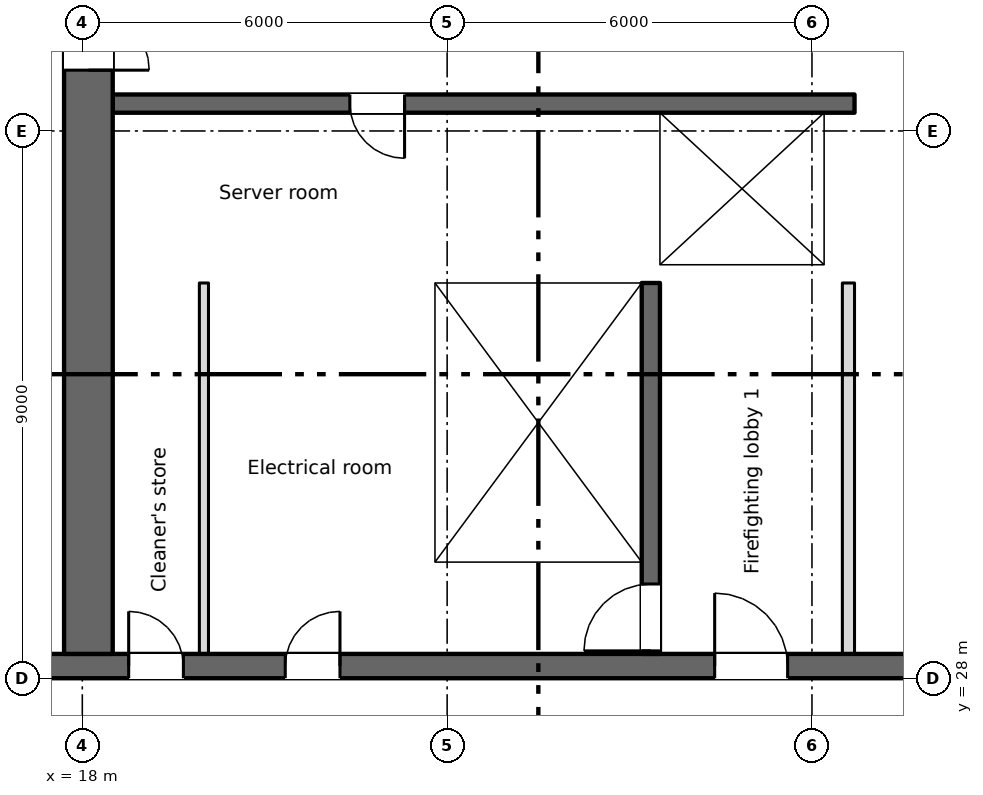
"""IFC4 building model, lengths in metres.
Left out: names, types, materials, properties, quantities, classifications, styles, units other than length and angle.
Written with IfcOpenShell. Run it as: python <this file> out.ifc"""

import sys

from ifc_helpers import new_model, si_unit, direction, frame, frame_2d, origin, place, context, subcontext, project, spatial, rectangle, extrude, element, fill, save


model = new_model("IFC4")
c1 = context("Model", 3, precision=1e-05, world=origin(), true_north=direction((0.0, 1.0)))
c2 = subcontext(c1, "Body", "Model", "MODEL_VIEW")
j1 = project(units=[si_unit("LENGTHUNIT", "METRE"), si_unit("PLANEANGLEUNIT", "RADIAN")], contexts=[c1])
p1 = place(None, origin())
s1 = spatial("IfcSite", under=j1, at=p1, CompositionType="ELEMENT")
p2 = place(p1, origin())
s2 = spatial("IfcBuilding", under=s1, at=p2, CompositionType="ELEMENT")
p3 = place(p2, frame((0.0, 0.0, 121.25)))
s3 = spatial("IfcBuildingStorey", under=s2, at=p3, CompositionType="ELEMENT", Elevation=121.25)
p4 = place(p3, frame((6.7, 28.2, 0.0), z_axis=(0.0, 0.0, 1.0), x_axis=(1.0, 0.0, 0.0)))
e1 = element("IfcWall", 1, at=p4, inside=s3, PredefinedType="SHEAR", context=c2, shape_type="SweptSolid", body=[
    extrude(rectangle(XDim=57.8, YDim=0.4, at=frame_2d((28.9, 0.0))), origin(), (0.0, 0.0, 1.0), 3.35),
])
p5 = place(p4, frame((12.062, 0.0, 0.0)))
e2 = element("IfcOpeningElement", 2, at=p5, cuts=e1, PredefinedType="OPENING", context=c2, shape_type="SweptSolid", body=[
    extrude(rectangle(XDim=0.9, YDim=2.1, at=frame_2d((0.45, 1.05))), frame((0.0, 0.21, 0.0), z_axis=(0.0, -1.0, 0.0), x_axis=(1.0, 0.0, 0.0)), (0.0, 0.0, 1.0), 0.42),
])
p6 = place(p4, frame((14.637, 0.0, 0.0)))
e3 = element("IfcOpeningElement", 3, at=p6, cuts=e1, PredefinedType="OPENING", context=c2, shape_type="SweptSolid", body=[
    extrude(rectangle(XDim=0.9, YDim=2.1, at=frame_2d((0.45, 1.05))), frame((0.0, 0.21, 0.0), z_axis=(0.0, -1.0, 0.0), x_axis=(1.0, 0.0, 0.0)), (0.0, 0.0, 1.0), 0.42),
])
p7 = place(p4, frame((49.062, 0.0, 0.0)))
e4 = element("IfcOpeningElement", 4, at=p7, cuts=e1, PredefinedType="OPENING", context=c2, shape_type="SweptSolid", body=[
    extrude(rectangle(XDim=0.9, YDim=2.1, at=frame_2d((0.45, 1.05))), frame((0.0, 0.21, 0.0), z_axis=(0.0, -1.0, 0.0), x_axis=(1.0, 0.0, 0.0)), (0.0, 0.0, 1.0), 0.42),
])
p8 = place(p4, frame((51.637, 0.0, 0.0)))
e5 = element("IfcOpeningElement", 5, at=p8, cuts=e1, PredefinedType="OPENING", context=c2, shape_type="SweptSolid", body=[
    extrude(rectangle(XDim=0.9, YDim=2.1, at=frame_2d((0.45, 1.05))), frame((0.0, 0.21, 0.0), z_axis=(0.0, -1.0, 0.0), x_axis=(1.0, 0.0, 0.0)), (0.0, 0.0, 1.0), 0.42),
])
p9 = place(p4, frame((1.35, 0.0, 0.0)))
e6 = element("IfcOpeningElement", 6, at=p9, cuts=e1, PredefinedType="OPENING", context=c2, shape_type="SweptSolid", body=[
    extrude(rectangle(XDim=0.9, YDim=2.1, at=frame_2d((0.45, 1.05))), frame((0.0, 0.21, 0.0), z_axis=(0.0, -1.0, 0.0), x_axis=(1.0, 0.0, 0.0)), (0.0, 0.0, 1.0), 0.42),
])
p10 = place(p4, frame((4.7, 0.0, 0.0)))
e7 = element("IfcOpeningElement", 7, at=p10, cuts=e1, PredefinedType="OPENING", context=c2, shape_type="SweptSolid", body=[
    extrude(rectangle(XDim=1.2, YDim=2.1, at=frame_2d((0.6, 1.05))), frame((0.0, 0.21, 0.0), z_axis=(0.0, -1.0, 0.0), x_axis=(1.0, 0.0, 0.0)), (0.0, 0.0, 1.0), 0.42),
])
p11 = place(p4, frame((31.7, 0.0, 0.0)))
e8 = element("IfcOpeningElement", 8, at=p11, cuts=e1, PredefinedType="OPENING", context=c2, shape_type="SweptSolid", body=[
    extrude(rectangle(XDim=1.2, YDim=2.1, at=frame_2d((0.6, 1.05))), frame((0.0, 0.21, 0.0), z_axis=(0.0, -1.0, 0.0), x_axis=(1.0, 0.0, 0.0)), (0.0, 0.0, 1.0), 0.42),
])
p12 = place(p4, frame((55.2, 0.0, 0.0)))
e9 = element("IfcOpeningElement", 9, at=p12, cuts=e1, PredefinedType="OPENING", context=c2, shape_type="SweptSolid", body=[
    extrude(rectangle(XDim=1.2, YDim=2.1, at=frame_2d((0.6, 1.05))), frame((0.0, 0.21, 0.0), z_axis=(0.0, -1.0, 0.0), x_axis=(1.0, 0.0, 0.0)), (0.0, 0.0, 1.0), 0.42),
])
p13 = place(p4, frame((21.7, 0.0, 0.0)))
e10 = element("IfcOpeningElement", 10, at=p13, cuts=e1, PredefinedType="OPENING", context=c2, shape_type="SweptSolid", body=[
    extrude(rectangle(XDim=1.2, YDim=2.1, at=frame_2d((0.6, 1.05))), frame((0.0, 0.21, 0.0), z_axis=(0.0, -1.0, 0.0), x_axis=(1.0, 0.0, 0.0)), (0.0, 0.0, 1.0), 0.42),
])
p14 = place(p4, frame((41.7, 0.0, 0.0)))
e11 = element("IfcOpeningElement", 11, at=p14, cuts=e1, PredefinedType="OPENING", context=c2, shape_type="SweptSolid", body=[
    extrude(rectangle(XDim=1.2, YDim=2.1, at=frame_2d((0.6, 1.05))), frame((0.0, 0.21, 0.0), z_axis=(0.0, -1.0, 0.0), x_axis=(1.0, 0.0, 0.0)), (0.0, 0.0, 1.0), 0.42),
])
p15 = place(p4, frame((24.85, 0.0, 0.0)))
e12 = element("IfcOpeningElement", 12, at=p15, cuts=e1, PredefinedType="OPENING", context=c2, shape_type="SweptSolid", body=[
    extrude(rectangle(XDim=2.4, YDim=2.1, at=frame_2d((1.2, 1.05))), frame((0.0, 0.21, 0.0), z_axis=(0.0, -1.0, 0.0), x_axis=(1.0, 0.0, 0.0)), (0.0, 0.0, 1.0), 0.42),
])
p16 = place(p4, frame((37.35, 0.0, 0.0)))
e13 = element("IfcOpeningElement", 13, at=p16, cuts=e1, PredefinedType="OPENING", context=c2, shape_type="SweptSolid", body=[
    extrude(rectangle(XDim=2.4, YDim=2.1, at=frame_2d((1.2, 1.05))), frame((0.0, 0.21, 0.0), z_axis=(0.0, -1.0, 0.0), x_axis=(1.0, 0.0, 0.0)), (0.0, 0.0, 1.0), 0.42),
])
p17 = place(p4, frame((7.95, 0.0, 0.0)))
e14 = element("IfcOpeningElement", 14, at=p17, cuts=e1, PredefinedType="OPENING", context=c2, shape_type="SweptSolid", body=[
    extrude(rectangle(XDim=2.4, YDim=2.1, at=frame_2d((1.2, 1.05))), frame((0.0, 0.21, 0.0), z_axis=(0.0, -1.0, 0.0), x_axis=(1.0, 0.0, 0.0)), (0.0, 0.0, 1.0), 0.42),
])
p18 = place(p4, frame((28.85, 0.0, 0.0)))
e15 = element("IfcOpeningElement", 15, at=p18, cuts=e1, PredefinedType="OPENING", context=c2, shape_type="SweptSolid", body=[
    extrude(rectangle(XDim=0.9, YDim=2.1, at=frame_2d((0.45, 1.05))), frame((0.0, 0.21, 0.0), z_axis=(0.0, -1.0, 0.0), x_axis=(1.0, 0.0, 0.0)), (0.0, 0.0, 1.0), 0.42),
])
p19 = place(p4, frame((34.85, 0.0, 0.0)))
e16 = element("IfcOpeningElement", 16, at=p19, cuts=e1, PredefinedType="OPENING", context=c2, shape_type="SweptSolid", body=[
    extrude(rectangle(XDim=0.9, YDim=2.1, at=frame_2d((0.45, 1.05))), frame((0.0, 0.21, 0.0), z_axis=(0.0, -1.0, 0.0), x_axis=(1.0, 0.0, 0.0)), (0.0, 0.0, 1.0), 0.42),
])
p20 = place(p3, frame((18.1, 28.4, 0.0), z_axis=(0.0, 0.0, 1.0), x_axis=(0.0, 1.0, 0.0)))
e17 = element("IfcWall", 17, at=p20, inside=s3, PredefinedType="SHEAR", context=c2, shape_type="SweptSolid", body=[
    extrude(rectangle(XDim=16.8, YDim=0.8, at=frame_2d((8.4, 0.0))), origin(), (0.0, 0.0, 1.0), 3.35),
])
p21 = place(p20, frame((9.6, 0.0, 0.0)))
e18 = element("IfcOpeningElement", 18, at=p21, cuts=e17, PredefinedType="OPENING", context=c2, shape_type="SweptSolid", body=[
    extrude(rectangle(XDim=2.0, YDim=2.1, at=frame_2d((1.0, 1.05))), frame((0.0, 0.41, 0.0), z_axis=(0.0, -1.0, 0.0), x_axis=(1.0, 0.0, 0.0)), (0.0, 0.0, 1.0), 0.82),
])
p22 = place(p20, frame((15.35, 0.0, 0.0)))
e19 = element("IfcOpeningElement", 19, at=p22, cuts=e17, PredefinedType="OPENING", context=c2, shape_type="SweptSolid", body=[
    extrude(rectangle(XDim=1.2, YDim=2.1, at=frame_2d((0.6, 1.05))), frame((0.0, 0.41, 0.0), z_axis=(0.0, -1.0, 0.0), x_axis=(1.0, 0.0, 0.0)), (0.0, 0.0, 1.0), 0.82),
])
p23 = place(p3, frame((23.65, 28.4, 0.0), z_axis=(0.0, 0.0, 1.0), x_axis=(0.0, 1.0, 0.0)))
e20 = element("IfcWall", 20, at=p23, inside=s3, PredefinedType="SHEAR", context=c2, shape_type="SweptSolid", body=[
    extrude(rectangle(XDim=6.1, YDim=0.3, at=frame_2d((3.05, 0.0))), origin(), (0.0, 0.0, 1.0), 3.35),
])
p24 = place(p3, frame((27.35, 28.4, 0.0), z_axis=(0.0, 0.0, 1.0), x_axis=(0.0, 1.0, 0.0)))
e21 = element("IfcWall", 21, at=p24, inside=s3, PredefinedType="SHEAR", context=c2, shape_type="SweptSolid", body=[
    extrude(rectangle(XDim=6.1, YDim=0.3, at=frame_2d((3.05, 0.0))), origin(), (0.0, 0.0, 1.0), 3.35),
])
p25 = place(p24, frame((0.05, 0.0, 0.0)))
e22 = element("IfcOpeningElement", 22, at=p25, cuts=e21, PredefinedType="OPENING", context=c2, shape_type="SweptSolid", body=[
    extrude(rectangle(XDim=1.1, YDim=2.1, at=frame_2d((0.55, 1.05))), frame((0.0, 0.16, 0.0), z_axis=(0.0, -1.0, 0.0), x_axis=(1.0, 0.0, 0.0)), (0.0, 0.0, 1.0), 0.32),
])
p26 = place(p3, frame((18.5, 34.65, 0.0), z_axis=(0.0, 0.0, 1.0), x_axis=(1.0, 0.0, 0.0)))
e23 = element("IfcWall", 23, at=p26, inside=s3, PredefinedType="SHEAR", context=c2, shape_type="SweptSolid", body=[
    extrude(rectangle(XDim=12.2, YDim=0.3, at=frame_2d((6.1, 0.0))), origin(), (0.0, 0.0, 1.0), 3.35),
])
p27 = place(p26, frame((9.8, 0.0, 0.0)))
e24 = element("IfcOpeningElement", 24, at=p27, cuts=e23, PredefinedType="OPENING", context=c2, shape_type="SweptSolid", body=[
    extrude(rectangle(XDim=1.1, YDim=2.1, at=frame_2d((0.55, 1.05))), frame((0.0, 0.16, 0.0), z_axis=(0.0, -1.0, 0.0), x_axis=(1.0, 0.0, 0.0)), (0.0, 0.0, 1.0), 0.32),
])
p28 = place(p3, frame((30.7, 37.45, 0.0), z_axis=(0.0, 0.0, 1.0), x_axis=(-1.0, 0.0, 0.0)))
e25 = element("IfcWall", 25, at=p28, inside=s3, PredefinedType="SHEAR", context=c2, shape_type="SweptSolid", body=[
    extrude(rectangle(XDim=12.2, YDim=0.3, at=frame_2d((6.1, 0.0))), origin(), (0.0, 0.0, 1.0), 3.35),
])
p29 = place(p28, frame((7.4, 0.0, 0.0)))
e26 = element("IfcOpeningElement", 26, at=p29, cuts=e25, PredefinedType="OPENING", context=c2, shape_type="SweptSolid", body=[
    extrude(rectangle(XDim=0.9, YDim=2.1, at=frame_2d((0.45, 1.05))), frame((0.0, 0.16, 0.0), z_axis=(0.0, -1.0, 0.0), x_axis=(1.0, 0.0, 0.0)), (0.0, 0.0, 1.0), 0.32),
])
p30 = place(p3, frame((27.35, 34.8, 0.0), z_axis=(0.0, 0.0, 1.0), x_axis=(0.0, 1.0, 0.0)))
e27 = element("IfcWall", 27, at=p30, inside=s3, PredefinedType="SHEAR", context=c2, shape_type="SweptSolid", body=[
    extrude(rectangle(XDim=2.5, YDim=0.3, at=frame_2d((1.25, 0.0))), origin(), (0.0, 0.0, 1.0), 3.35),
])
p31 = place(p3, frame((30.45, 34.8, 0.0), z_axis=(0.0, 0.0, 1.0), x_axis=(0.0, 1.0, 0.0)))
e28 = element("IfcWall", 28, at=p31, inside=s3, PredefinedType="SHEAR", context=c2, shape_type="SweptSolid", body=[
    extrude(rectangle(XDim=2.5, YDim=0.5, at=frame_2d((1.25, 0.0))), origin(), (0.0, 0.0, 1.0), 3.35),
])
p32 = place(p3, frame((30.6, 28.4, 0.0), z_axis=(0.0, 0.0, 1.0), x_axis=(0.0, 1.0, 0.0)))
e29 = element("IfcWall", 29, at=p32, inside=s3, PredefinedType="PARTITIONING", context=c2, shape_type="SweptSolid", body=[
    extrude(rectangle(XDim=6.1, YDim=0.2, at=frame_2d((3.05, 0.0))), origin(), (0.0, 0.0, 1.0), 3.35),
])
p33 = place(p3, frame((20.0, 28.4, 0.0), z_axis=(0.0, 0.0, 1.0), x_axis=(0.0, 1.0, 0.0)))
e30 = element("IfcWall", 30, at=p33, inside=s3, PredefinedType="PARTITIONING", context=c2, shape_type="SweptSolid", body=[
    extrude(rectangle(XDim=6.1, YDim=0.15, at=frame_2d((3.05, 0.0))), origin(), (0.0, 0.0, 1.0), 3.35),
])
p34 = place(p5, origin())
e31 = element("IfcDoor", 31, at=p34, inside=s3, OperationType="SINGLE_SWING_LEFT", PredefinedType="DOOR", context=c2, shape_type="SweptSolid", body=[
    extrude(rectangle(XDim=0.9, YDim=2.1, at=frame_2d((0.45, 1.05))), frame((0.0, 0.025, 0.0), z_axis=(0.0, -1.0, 0.0), x_axis=(1.0, 0.0, 0.0)), (0.0, 0.0, 1.0), 0.05),
])
fill(e2, e31)
p35 = place(p6, origin())
e32 = element("IfcDoor", 32, at=p35, inside=s3, OperationType="SINGLE_SWING_RIGHT", PredefinedType="DOOR", context=c2, shape_type="SweptSolid", body=[
    extrude(rectangle(XDim=0.9, YDim=2.1, at=frame_2d((0.45, 1.05))), frame((0.0, 0.025, 0.0), z_axis=(0.0, -1.0, 0.0), x_axis=(1.0, 0.0, 0.0)), (0.0, 0.0, 1.0), 0.05),
])
fill(e3, e32)
p36 = place(p29, origin())
e33 = element("IfcDoor", 33, at=p36, inside=s3, OperationType="SINGLE_SWING_LEFT", PredefinedType="DOOR", context=c2, shape_type="SweptSolid", body=[
    extrude(rectangle(XDim=0.9, YDim=2.1, at=frame_2d((0.45, 1.05))), frame((0.0, 0.025, 0.0), z_axis=(0.0, -1.0, 0.0), x_axis=(1.0, 0.0, 0.0)), (0.0, 0.0, 1.0), 0.05),
])
fill(e26, e33)
p37 = place(p27, origin())
e34 = element("IfcDoor", 34, at=p37, inside=s3, OperationType="SLIDING_TO_LEFT", PredefinedType="DOOR", context=c2, shape_type="SweptSolid", body=[
    extrude(rectangle(XDim=1.1, YDim=2.1, at=frame_2d((0.55, 1.05))), frame((0.0, 0.025, 0.0), z_axis=(0.0, -1.0, 0.0), x_axis=(1.0, 0.0, 0.0)), (0.0, 0.0, 1.0), 0.05),
])
fill(e24, e34)
p38 = place(p25, origin())
e35 = element("IfcDoor", 35, at=p38, inside=s3, OperationType="SINGLE_SWING_LEFT", PredefinedType="DOOR", context=c2, shape_type="SweptSolid", body=[
    extrude(rectangle(XDim=1.1, YDim=2.1, at=frame_2d((0.55, 1.05))), frame((0.0, 0.025, 0.0), z_axis=(0.0, -1.0, 0.0), x_axis=(1.0, 0.0, 0.0)), (0.0, 0.0, 1.0), 0.05),
])
fill(e22, e35)
p39 = place(p13, origin())
e36 = element("IfcDoor", 36, at=p39, inside=s3, OperationType="SINGLE_SWING_LEFT", PredefinedType="DOOR", context=c2, shape_type="SweptSolid", body=[
    extrude(rectangle(XDim=1.2, YDim=2.1, at=frame_2d((0.6, 1.05))), frame((0.0, 0.025, 0.0), z_axis=(0.0, -1.0, 0.0), x_axis=(1.0, 0.0, 0.0)), (0.0, 0.0, 1.0), 0.05),
])
fill(e10, e36)
p40 = place(p21, origin())
e37 = element("IfcDoor", 37, at=p40, inside=s3, OperationType="DOUBLE_DOOR_SINGLE_SWING", PredefinedType="DOOR", context=c2, shape_type="SweptSolid", body=[
    extrude(rectangle(XDim=2.0, YDim=2.1, at=frame_2d((1.0, 1.05))), frame((0.0, 0.025, 0.0), z_axis=(0.0, -1.0, 0.0), x_axis=(1.0, 0.0, 0.0)), (0.0, 0.0, 1.0), 0.05),
])
fill(e18, e37)
save(model, sys.argv[1])
